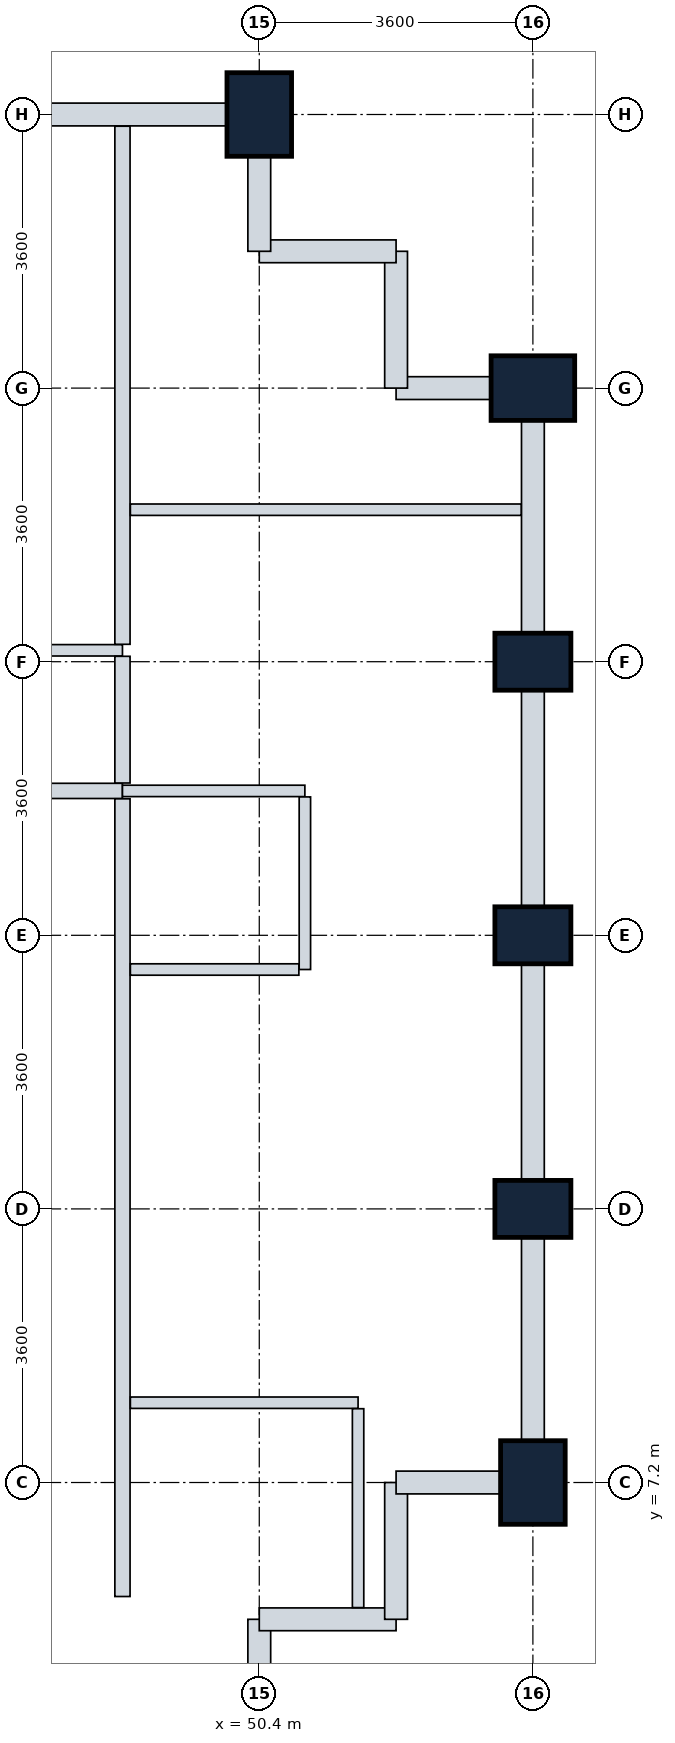
"""IFC4 building model, lengths in metres.
Left out: names, types, materials, properties, quantities, classifications, styles, units other than length and angle.
Written with IfcOpenShell. Run it as: python <this file> out.ifc"""

import sys

from ifc_helpers import new_model, si_unit, direction, frame, frame_2d, origin, origin_2d, place, context, subcontext, project, spatial, rectangle, extrude, element, fill, save


model = new_model("IFC4")
c1 = context("Model", 3, precision=1e-05, world=origin(), true_north=direction((0.0, 1.0)))
c2 = subcontext(c1, "Body", "Model", "MODEL_VIEW")
j1 = project(units=[si_unit("LENGTHUNIT", "METRE"), si_unit("PLANEANGLEUNIT", "RADIAN")], contexts=[c1])
p1 = place(None, origin())
s1 = spatial("IfcSite", under=j1, at=p1, CompositionType="ELEMENT")
p2 = place(p1, origin())
s2 = spatial("IfcBuilding", under=s1, at=p2, CompositionType="ELEMENT")
p3 = place(p2, frame((0.0, 0.0, 139.0)))
s3 = spatial("IfcBuildingStorey", under=s2, at=p3, CompositionType="ELEMENT", Elevation=139.0)
for number, where, z_axis, x_axis in (
    (1, (50.4, 25.2, 0.0), (0.0, 0.0, 1.0), (1.0, 0.0, 0.0)),
    (2, (54.0, 7.2, 0.0), (0.0, 0.0, 1.0), (1.0, 0.0, 0.0)),
):
    element("IfcColumn", number, at=place(p3, frame(where, z_axis=z_axis, x_axis=x_axis)), inside=s3, PredefinedType="COLUMN", context=c2, shape_type="SweptSolid", body=[
        extrude(rectangle(XDim=0.85, YDim=1.1, at=origin_2d()), origin(), (0.0, 0.0, 1.0), 3.8),
    ])
for number, where, z_axis, x_axis in (
    (3, (54.0, 10.8, 0.0), (0.0, 0.0, 1.0), (0.0, 1.0, 0.0)),
    (4, (54.0, 14.4, 0.0), (0.0, 0.0, 1.0), (0.0, 1.0, 0.0)),
    (5, (54.0, 18.0, 0.0), (0.0, 0.0, 1.0), (0.0, 1.0, 0.0)),
):
    element("IfcColumn", number, at=place(p3, frame(where, z_axis=z_axis, x_axis=x_axis)), inside=s3, PredefinedType="COLUMN", context=c2, shape_type="SweptSolid", body=[
        extrude(rectangle(XDim=0.75, YDim=1.0, at=origin_2d()), origin(), (0.0, 0.0, 1.0), 3.8),
    ])
p4 = place(p3, frame((54.0, 21.6, 0.0), z_axis=(0.0, 0.0, 1.0), x_axis=(0.0, 1.0, 0.0)))
e6 = element("IfcColumn", 6, at=p4, inside=s3, PredefinedType="COLUMN", context=c2, shape_type="SweptSolid", body=[
    extrude(rectangle(XDim=0.85, YDim=1.1, at=origin_2d()), origin(), (0.0, 0.0, 1.0), 3.8),
])
p5 = place(p3, frame((50.4, 5.4, 0.0), z_axis=(0.0, 0.0, 1.0), x_axis=(0.0, -1.0, 0.0)))
e7 = element("IfcWall", 7, at=p5, inside=s3, PredefinedType="STANDARD", context=c2, shape_type="SweptSolid", body=[
    extrude(rectangle(XDim=1.8, YDim=0.3, at=frame_2d((0.9, 0.0))), origin(), (0.0, 0.0, 1.0), 2.93),
])
for number, where, z_axis, x_axis in (
    (8, (52.2, 5.4, 0.0), (0.0, 0.0, 1.0), (-1.0, 0.0, 0.0)),
    (9, (52.2, 7.2, 0.0), (0.0, 0.0, 1.0), (0.0, -1.0, 0.0)),
):
    element("IfcWall", number, at=place(p3, frame(where, z_axis=z_axis, x_axis=x_axis)), inside=s3, PredefinedType="STANDARD", context=c2, shape_type="SweptSolid", body=[
        extrude(rectangle(XDim=1.8, YDim=0.3, at=frame_2d((0.9, 0.0))), origin(), (0.0, 0.0, 1.0), 3.535),
    ])
p6 = place(p3, frame((54.0, 7.2, 0.0), z_axis=(0.0, 0.0, 1.0), x_axis=(-1.0, 0.0, 0.0)))
e10 = element("IfcWall", 10, at=p6, inside=s3, PredefinedType="STANDARD", context=c2, shape_type="SweptSolid", body=[
    extrude(rectangle(XDim=1.8, YDim=0.3, at=frame_2d((0.9, 0.0))), origin(), (0.0, 0.0, 1.0), 2.93),
])
p7 = place(p3, frame((54.0, 10.8, 0.0), z_axis=(0.0, 0.0, 1.0), x_axis=(0.0, -1.0, 0.0)))
e11 = element("IfcWall", 11, at=p7, inside=s3, PredefinedType="STANDARD", context=c2, shape_type="SweptSolid", body=[
    extrude(rectangle(XDim=3.6, YDim=0.3, at=frame_2d((1.8, 0.0))), origin(), (0.0, 0.0, 1.0), 2.93),
])
p8 = place(p7, frame((0.725, 0.0, 0.85)))
e12 = element("IfcOpeningElement", 12, at=p8, cuts=e11, PredefinedType="OPENING", context=c2, shape_type="SweptSolid", body=[
    extrude(rectangle(XDim=2.1, YDim=1.35, at=frame_2d((1.05, 0.675))), frame((0.0, 0.16, 0.0), z_axis=(0.0, -1.0, 0.0), x_axis=(1.0, 0.0, 0.0)), (0.0, 0.0, 1.0), 0.32),
])
p9 = place(p3, frame((54.0, 14.4, 0.0), z_axis=(0.0, 0.0, 1.0), x_axis=(0.0, -1.0, 0.0)))
e13 = element("IfcWall", 13, at=p9, inside=s3, PredefinedType="STANDARD", context=c2, shape_type="SweptSolid", body=[
    extrude(rectangle(XDim=3.6, YDim=0.3, at=frame_2d((1.8, 0.0))), origin(), (0.0, 0.0, 1.0), 2.93),
])
p10 = place(p9, frame((0.75, 0.0, 0.85)))
e14 = element("IfcOpeningElement", 14, at=p10, cuts=e13, PredefinedType="OPENING", context=c2, shape_type="SweptSolid", body=[
    extrude(rectangle(XDim=2.1, YDim=1.35, at=frame_2d((1.05, 0.675))), frame((0.0, 0.16, 0.0), z_axis=(0.0, -1.0, 0.0), x_axis=(1.0, 0.0, 0.0)), (0.0, 0.0, 1.0), 0.32),
])
p11 = place(p3, frame((54.0, 18.0, 0.0), z_axis=(0.0, 0.0, 1.0), x_axis=(0.0, -1.0, 0.0)))
e15 = element("IfcWall", 15, at=p11, inside=s3, PredefinedType="STANDARD", context=c2, shape_type="SweptSolid", body=[
    extrude(rectangle(XDim=3.6, YDim=0.3, at=frame_2d((1.8, 0.0))), origin(), (0.0, 0.0, 1.0), 2.93),
])
p12 = place(p11, frame((0.75, 0.0, 0.85)))
e16 = element("IfcOpeningElement", 16, at=p12, cuts=e15, PredefinedType="OPENING", context=c2, shape_type="SweptSolid", body=[
    extrude(rectangle(XDim=2.1, YDim=1.35, at=frame_2d((1.05, 0.675))), frame((0.0, 0.16, 0.0), z_axis=(0.0, -1.0, 0.0), x_axis=(1.0, 0.0, 0.0)), (0.0, 0.0, 1.0), 0.32),
])
p13 = place(p3, frame((54.0, 21.6, 0.0), z_axis=(0.0, 0.0, 1.0), x_axis=(0.0, -1.0, 0.0)))
e17 = element("IfcWall", 17, at=p13, inside=s3, PredefinedType="STANDARD", context=c2, shape_type="SweptSolid", body=[
    extrude(rectangle(XDim=3.6, YDim=0.3, at=frame_2d((1.8, 0.0))), origin(), (0.0, 0.0, 1.0), 2.93),
])
p14 = place(p3, frame((52.2, 21.6, 0.0), z_axis=(0.0, 0.0, 1.0), x_axis=(1.0, 0.0, 0.0)))
e18 = element("IfcWall", 18, at=p14, inside=s3, PredefinedType="STANDARD", context=c2, shape_type="SweptSolid", body=[
    extrude(rectangle(XDim=1.8, YDim=0.3, at=frame_2d((0.9, 0.0))), origin(), (0.0, 0.0, 1.0), 2.93),
])
p15 = place(p14, frame((0.18, 0.0, 0.85)))
e19 = element("IfcOpeningElement", 19, at=p15, cuts=e18, PredefinedType="OPENING", context=c2, shape_type="SweptSolid", body=[
    extrude(rectangle(XDim=0.75, YDim=1.05, at=frame_2d((0.375, 0.525))), frame((0.0, 0.16, 0.0), z_axis=(0.0, -1.0, 0.0), x_axis=(1.0, 0.0, 0.0)), (0.0, 0.0, 1.0), 0.32),
])
p16 = place(p3, frame((52.2, 23.4, 0.0), z_axis=(0.0, 0.0, 1.0), x_axis=(0.0, -1.0, 0.0)))
e20 = element("IfcWall", 20, at=p16, inside=s3, PredefinedType="STANDARD", context=c2, shape_type="SweptSolid", body=[
    extrude(rectangle(XDim=1.8, YDim=0.3, at=frame_2d((0.9, 0.0))), origin(), (0.0, 0.0, 1.0), 3.535),
])
p17 = place(p3, frame((50.4, 23.4, 0.0), z_axis=(0.0, 0.0, 1.0), x_axis=(1.0, 0.0, 0.0)))
e21 = element("IfcWall", 21, at=p17, inside=s3, PredefinedType="STANDARD", context=c2, shape_type="SweptSolid", body=[
    extrude(rectangle(XDim=1.8, YDim=0.3, at=frame_2d((0.9, 0.0))), origin(), (0.0, 0.0, 1.0), 3.535),
])
p18 = place(p3, frame((50.4, 25.2, 0.0), z_axis=(0.0, 0.0, 1.0), x_axis=(0.0, -1.0, 0.0)))
e22 = element("IfcWall", 22, at=p18, inside=s3, PredefinedType="STANDARD", context=c2, shape_type="SweptSolid", body=[
    extrude(rectangle(XDim=1.8, YDim=0.3, at=frame_2d((0.9, 0.0))), origin(), (0.0, 0.0, 1.0), 2.93),
])
p19 = place(p3, frame((46.8, 25.2, 0.0), z_axis=(0.0, 0.0, 1.0), x_axis=(1.0, 0.0, 0.0)))
e23 = element("IfcWall", 23, at=p19, inside=s3, PredefinedType="STANDARD", context=c2, shape_type="SweptSolid", body=[
    extrude(rectangle(XDim=3.6, YDim=0.3, at=frame_2d((1.8, 0.0))), origin(), (0.0, 0.0, 1.0), 2.93),
])
p20 = place(p3, frame((45.68, 16.3, 0.0), z_axis=(0.0, 0.0, 1.0), x_axis=(1.0, 0.0, 0.0)))
e24 = element("IfcWall", 24, at=p20, inside=s3, PredefinedType="PARTITIONING", context=c2, shape_type="SweptSolid", body=[
    extrude(rectangle(XDim=2.92, YDim=0.2, at=frame_2d((1.46, 0.0))), origin(), (0.0, 0.0, 1.0), 3.17),
])
p21 = place(p3, frame((43.904, 18.15, 0.0), z_axis=(0.0, 0.0, 1.0), x_axis=(1.0, 0.0, 0.0)))
e25 = element("IfcWall", 25, at=p21, inside=s3, PredefinedType="PARTITIONING", context=c2, shape_type="SweptSolid", body=[
    extrude(rectangle(XDim=4.696, YDim=0.15, at=frame_2d((2.348, 0.0))), origin(), (0.0, 0.0, 1.0), 3.17),
])
p22 = place(p21, frame((1.757, 0.0, 0.0)))
e26 = element("IfcOpeningElement", 26, at=p22, cuts=e25, PredefinedType="OPENING", context=c2, shape_type="SweptSolid", body=[
    extrude(rectangle(XDim=1.0, YDim=2.1, at=frame_2d((0.5, 1.05))), frame((0.0, 0.085, 0.0), z_axis=(0.0, -1.0, 0.0), x_axis=(1.0, 0.0, 0.0)), (0.0, 0.0, 1.0), 0.17),
])
p23 = place(p3, frame((48.6, 5.7, 0.0), z_axis=(0.0, 0.0, 1.0), x_axis=(0.0, 1.0, 0.0)))
e27 = element("IfcWall", 27, at=p23, inside=s3, PredefinedType="PARTITIONING", context=c2, shape_type="SweptSolid", body=[
    extrude(rectangle(XDim=10.496, YDim=0.2, at=frame_2d((5.248, 0.0))), origin(), (0.0, 0.0, 1.0), 3.17),
])
p24 = place(p3, frame((48.6, 18.229, 0.0), z_axis=(0.0, 0.0, 1.0), x_axis=(0.0, 1.0, 0.0)))
e28 = element("IfcWall", 28, at=p24, inside=s3, PredefinedType="PARTITIONING", context=c2, shape_type="SweptSolid", body=[
    extrude(rectangle(XDim=6.817, YDim=0.2, at=frame_2d((3.408, 0.0))), origin(), (0.0, 0.0, 1.0), 2.93),
])
p25 = place(p3, frame((48.6, 16.404, 0.0), z_axis=(0.0, 0.0, 1.0), x_axis=(0.0, 1.0, 0.0)))
e29 = element("IfcWall", 29, at=p25, inside=s3, PredefinedType="PARTITIONING", context=c2, shape_type="SweptSolid", body=[
    extrude(rectangle(XDim=1.667, YDim=0.2, at=frame_2d((0.833, 0.0))), origin(), (0.0, 0.0, 1.0), 3.535),
])
p26 = place(p25, frame((0.314, 0.0, 0.0)))
e30 = element("IfcOpeningElement", 30, at=p26, cuts=e29, PredefinedType="OPENING", context=c2, shape_type="SweptSolid", body=[
    extrude(rectangle(XDim=1.0, YDim=2.1, at=frame_2d((0.5, 1.05))), frame((0.0, 0.11, 0.0), z_axis=(0.0, -1.0, 0.0), x_axis=(1.0, 0.0, 0.0)), (0.0, 0.0, 1.0), 0.22),
])
p27 = place(p3, frame((48.6, 16.3, 0.0), z_axis=(0.0, 0.0, 1.0), x_axis=(1.0, 0.0, 0.0)))
e31 = element("IfcWall", 31, at=p27, inside=s3, PredefinedType="PARTITIONING", context=c2, shape_type="SweptSolid", body=[
    extrude(rectangle(XDim=2.4, YDim=0.15, at=frame_2d((1.2, 0.0))), origin(), (0.0, 0.0, 1.0), 3.535),
])
p28 = place(p3, frame((51.0, 13.95, 0.0), z_axis=(0.0, 0.0, 1.0), x_axis=(0.0, 1.0, 0.0)))
e32 = element("IfcWall", 32, at=p28, inside=s3, PredefinedType="PARTITIONING", context=c2, shape_type="SweptSolid", body=[
    extrude(rectangle(XDim=2.271, YDim=0.15, at=frame_2d((1.135, 0.0))), origin(), (0.0, 0.0, 1.0), 3.17),
])
p29 = place(p28, frame((0.78, 0.0, 0.0)))
e33 = element("IfcOpeningElement", 33, at=p29, cuts=e32, PredefinedType="OPENING", context=c2, shape_type="SweptSolid", body=[
    extrude(rectangle(XDim=0.85, YDim=2.1, at=frame_2d((0.425, 1.05))), frame((0.0, 0.085, 0.0), z_axis=(0.0, -1.0, 0.0), x_axis=(1.0, 0.0, 0.0)), (0.0, 0.0, 1.0), 0.17),
])
p30 = place(p3, frame((48.704, 13.95, 0.0), z_axis=(0.0, 0.0, 1.0), x_axis=(1.0, 0.0, 0.0)))
e34 = element("IfcWall", 34, at=p30, inside=s3, PredefinedType="PARTITIONING", context=c2, shape_type="SweptSolid", body=[
    extrude(rectangle(XDim=2.217, YDim=0.15, at=frame_2d((1.108, 0.0))), origin(), (0.0, 0.0, 1.0), 3.535),
])
p31 = place(p3, frame((48.704, 20.0, 0.0), z_axis=(0.0, 0.0, 1.0), x_axis=(1.0, 0.0, 0.0)))
e35 = element("IfcWall", 35, at=p31, inside=s3, PredefinedType="PARTITIONING", context=c2, shape_type="SweptSolid", body=[
    extrude(rectangle(XDim=5.142, YDim=0.15, at=frame_2d((2.571, 0.0))), origin(), (0.0, 0.0, 1.0), 2.93),
])
p32 = place(p31, frame((1.516, 0.0, 0.0)))
e36 = element("IfcOpeningElement", 36, at=p32, cuts=e35, PredefinedType="OPENING", context=c2, shape_type="SweptSolid", body=[
    extrude(rectangle(XDim=0.9, YDim=2.1, at=frame_2d((0.45, 1.05))), frame((0.0, 0.085, 0.0), z_axis=(0.0, -1.0, 0.0), x_axis=(1.0, 0.0, 0.0)), (0.0, 0.0, 1.0), 0.17),
])
p33 = place(p3, frame((48.704, 8.25, 0.0), z_axis=(0.0, 0.0, 1.0), x_axis=(1.0, 0.0, 0.0)))
e37 = element("IfcWall", 37, at=p33, inside=s3, PredefinedType="PARTITIONING", context=c2, shape_type="SweptSolid", body=[
    extrude(rectangle(XDim=2.996, YDim=0.15, at=frame_2d((1.498, 0.0))), origin(), (0.0, 0.0, 1.0), 3.535),
])
p34 = place(p33, frame((1.021, 0.0, 0.0)))
e38 = element("IfcOpeningElement", 38, at=p34, cuts=e37, PredefinedType="OPENING", context=c2, shape_type="SweptSolid", body=[
    extrude(rectangle(XDim=0.85, YDim=2.1, at=frame_2d((0.425, 1.05))), frame((0.0, 0.085, 0.0), z_axis=(0.0, -1.0, 0.0), x_axis=(1.0, 0.0, 0.0)), (0.0, 0.0, 1.0), 0.17),
])
p35 = place(p3, frame((51.7, 5.554, 0.0), z_axis=(0.0, 0.0, 1.0), x_axis=(0.0, 1.0, 0.0)))
e39 = element("IfcWall", 39, at=p35, inside=s3, PredefinedType="PARTITIONING", context=c2, shape_type="SweptSolid", body=[
    extrude(rectangle(XDim=2.617, YDim=0.15, at=frame_2d((1.309, 0.0))), origin(), (0.0, 0.0, 1.0), 3.535),
])
p36 = place(p8, origin())
e40 = element("IfcWindow", 40, at=p36, inside=s3, PartitioningType="SINGLE_PANEL", PredefinedType="WINDOW", context=c2, shape_type="SweptSolid", body=[
    extrude(rectangle(XDim=2.1, YDim=1.35, at=frame_2d((1.05, 0.675))), frame((0.0, 0.03, 0.0), z_axis=(0.0, -1.0, 0.0), x_axis=(1.0, 0.0, 0.0)), (0.0, 0.0, 1.0), 0.06),
])
fill(e12, e40)
p37 = place(p10, origin())
e41 = element("IfcWindow", 41, at=p37, inside=s3, PartitioningType="SINGLE_PANEL", PredefinedType="WINDOW", context=c2, shape_type="SweptSolid", body=[
    extrude(rectangle(XDim=2.1, YDim=1.35, at=frame_2d((1.05, 0.675))), frame((0.0, 0.03, 0.0), z_axis=(0.0, -1.0, 0.0), x_axis=(1.0, 0.0, 0.0)), (0.0, 0.0, 1.0), 0.06),
])
fill(e14, e41)
p38 = place(p12, origin())
e42 = element("IfcWindow", 42, at=p38, inside=s3, PartitioningType="SINGLE_PANEL", PredefinedType="WINDOW", context=c2, shape_type="SweptSolid", body=[
    extrude(rectangle(XDim=2.1, YDim=1.35, at=frame_2d((1.05, 0.675))), frame((0.0, 0.03, 0.0), z_axis=(0.0, -1.0, 0.0), x_axis=(1.0, 0.0, 0.0)), (0.0, 0.0, 1.0), 0.06),
])
fill(e16, e42)
p39 = place(p26, origin())
e43 = element("IfcDoor", 43, at=p39, inside=s3, OperationType="SINGLE_SWING_RIGHT", PredefinedType="DOOR", context=c2, shape_type="SweptSolid", body=[
    extrude(rectangle(XDim=1.0, YDim=2.1, at=frame_2d((0.5, 1.05))), frame((0.0, 0.025, 0.0), z_axis=(0.0, -1.0, 0.0), x_axis=(1.0, 0.0, 0.0)), (0.0, 0.0, 1.0), 0.05),
])
fill(e30, e43)
p40 = place(p29, origin())
e44 = element("IfcDoor", 44, at=p40, inside=s3, OperationType="SINGLE_SWING_RIGHT", PredefinedType="DOOR", context=c2, shape_type="SweptSolid", body=[
    extrude(rectangle(XDim=0.85, YDim=2.1, at=frame_2d((0.425, 1.05))), frame((0.0, 0.025, 0.0), z_axis=(0.0, -1.0, 0.0), x_axis=(1.0, 0.0, 0.0)), (0.0, 0.0, 1.0), 0.05),
])
fill(e33, e44)
p41 = place(p32, origin())
e45 = element("IfcDoor", 45, at=p41, inside=s3, OperationType="SINGLE_SWING_LEFT", PredefinedType="DOOR", context=c2, shape_type="SweptSolid", body=[
    extrude(rectangle(XDim=0.9, YDim=2.1, at=frame_2d((0.45, 1.05))), frame((0.0, 0.025, 0.0), z_axis=(0.0, -1.0, 0.0), x_axis=(1.0, 0.0, 0.0)), (0.0, 0.0, 1.0), 0.05),
])
fill(e36, e45)
p42 = place(p34, origin())
e46 = element("IfcDoor", 46, at=p42, inside=s3, OperationType="SINGLE_SWING_RIGHT", PredefinedType="DOOR", context=c2, shape_type="SweptSolid", body=[
    extrude(rectangle(XDim=0.85, YDim=2.1, at=frame_2d((0.425, 1.05))), frame((0.0, 0.025, 0.0), z_axis=(0.0, -1.0, 0.0), x_axis=(1.0, 0.0, 0.0)), (0.0, 0.0, 1.0), 0.05),
])
fill(e38, e46)
p43 = place(p15, origin())
e47 = element("IfcWindow", 47, at=p43, inside=s3, PartitioningType="SINGLE_PANEL", PredefinedType="WINDOW", context=c2, shape_type="SweptSolid", body=[
    extrude(rectangle(XDim=0.75, YDim=1.05, at=frame_2d((0.375, 0.525))), frame((0.0, 0.03, 0.0), z_axis=(0.0, -1.0, 0.0), x_axis=(1.0, 0.0, 0.0)), (0.0, 0.0, 1.0), 0.06),
])
fill(e19, e47)
save(model, sys.argv[1])
